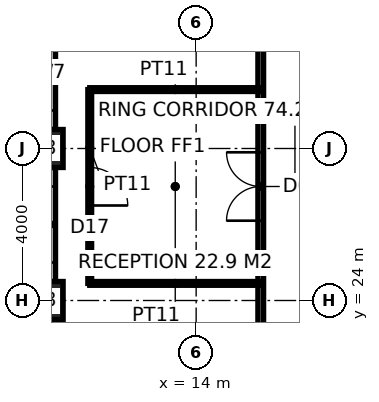
"""IFC4 building model, lengths in metres.
Left out: names, types, materials, properties, quantities, classifications, styles, units other than length and angle.
Written with IfcOpenShell. Run it as: python <this file> out.ifc"""

import sys

from ifc_helpers import new_model, si_unit, direction, frame, frame_2d, origin, origin_2d, place, context, subcontext, project, spatial, rectangle, hollow_rectangle, extrude, element, fill, save


model = new_model("IFC4")
c1 = context("Model", 3, precision=1e-05, world=origin(), true_north=direction((0.0, 1.0)))
c2 = subcontext(c1, "Body", "Model", "MODEL_VIEW")
j1 = project(units=[si_unit("LENGTHUNIT", "METRE"), si_unit("PLANEANGLEUNIT", "RADIAN")], contexts=[c1])
p1 = place(None, origin())
s1 = spatial("IfcSite", under=j1, at=p1, CompositionType="ELEMENT")
p2 = place(p1, origin())
s2 = spatial("IfcBuilding", under=s1, at=p2, CompositionType="ELEMENT")
p3 = place(p2, frame((0.0, 0.0, 101.4)))
s3 = spatial("IfcBuildingStorey", under=s2, at=p3, CompositionType="ELEMENT", Elevation=101.4)
for number, where, z_axis, x_axis in (
    (1, (10.0, 24.0, 0.0), (0.0, 0.0, 1.0), (1.0, 0.0, 0.0)),
    (2, (10.0, 28.0, 0.0), (0.0, 0.0, 1.0), (1.0, 0.0, 0.0)),
):
    element("IfcColumn", number, at=place(p3, frame(where, z_axis=z_axis, x_axis=x_axis)), inside=s3, PredefinedType="COLUMN", context=c2, shape_type="SweptSolid", body=[
        extrude(hollow_rectangle(XDim=1.0, YDim=1.0, WallThickness=0.125, at=origin_2d()), origin(), (0.0, 0.0, 1.0), 4.0),
    ])
p4 = place(p3, frame((15.7, 15.625, 0.0), z_axis=(0.0, 0.0, 1.0), x_axis=(0.0, 1.0, 0.0)))
e3 = element("IfcWall", 3, at=p4, inside=s3, PredefinedType="PARTITIONING", context=c2, shape_type="SweptSolid", body=[
    extrude(rectangle(XDim=22.75, YDim=0.15, at=frame_2d((11.375, 0.0))), origin(), (0.0, 0.0, 1.0), 3.85),
])
p5 = place(p4, frame((10.475, 0.0, 0.0)))
e4 = element("IfcOpeningElement", 4, at=p5, cuts=e3, PredefinedType="OPENING", context=c2, shape_type="SweptSolid", body=[
    extrude(rectangle(XDim=1.8, YDim=2.4, at=frame_2d((0.9, 1.2))), frame((0.0, 0.085, 0.0), z_axis=(0.0, -1.0, 0.0), x_axis=(1.0, 0.0, 0.0)), (0.0, 0.0, 1.0), 0.17),
])
p6 = place(p3, frame((15.7, 29.55, 0.0), z_axis=(0.0, 0.0, 1.0), x_axis=(-1.0, 0.0, 0.0)))
e5 = element("IfcWall", 5, at=p6, inside=s3, PredefinedType="PARTITIONING", context=c2, shape_type="SweptSolid", body=[
    extrude(rectangle(XDim=4.5, YDim=0.1, at=frame_2d((2.25, 0.0))), origin(), (0.0, 0.0, 1.0), 3.85),
])
p7 = place(p3, frame((11.2, 29.55, 0.0), z_axis=(0.0, 0.0, 1.0), x_axis=(0.0, -1.0, 0.0)))
e6 = element("IfcWall", 6, at=p7, inside=s3, PredefinedType="PARTITIONING", context=c2, shape_type="SweptSolid", body=[
    extrude(rectangle(XDim=5.1, YDim=0.1, at=frame_2d((2.55, 0.0))), origin(), (0.0, 0.0, 1.0), 3.85),
])
p8 = place(p7, frame((2.05, 0.0, 0.0)))
e7 = element("IfcOpeningElement", 7, at=p8, cuts=e6, PredefinedType="OPENING", context=c2, shape_type="SweptSolid", body=[
    extrude(rectangle(XDim=1.0, YDim=2.2, at=frame_2d((0.5, 1.1))), frame((0.0, 0.06, 0.0), z_axis=(0.0, -1.0, 0.0), x_axis=(1.0, 0.0, 0.0)), (0.0, 0.0, 1.0), 0.12),
])
p9 = place(p3, frame((11.2, 24.45, 0.0), z_axis=(0.0, 0.0, 1.0), x_axis=(1.0, 0.0, 0.0)))
e8 = element("IfcWall", 8, at=p9, inside=s3, PredefinedType="PARTITIONING", context=c2, shape_type="SweptSolid", body=[
    extrude(rectangle(XDim=4.5, YDim=0.1, at=frame_2d((2.25, 0.0))), origin(), (0.0, 0.0, 1.0), 2.65),
])
p10 = place(p3, frame((10.15, 23.5, 0.0), z_axis=(0.0, 0.0, 1.0), x_axis=(0.0, -1.0, 0.0)))
e9 = element("IfcWall", 9, at=p10, inside=s3, PredefinedType="ELEMENTEDWALL", context=c2, shape_type="SweptSolid", body=[
    extrude(rectangle(XDim=3.0, YDim=0.3, at=frame_2d((1.5, 0.0))), origin(), (0.0, 0.0, 1.0), 2.95),
])
p11 = place(p10, frame((0.5, 0.0, 0.8)))
e10 = element("IfcOpeningElement", 10, at=p11, cuts=e9, PredefinedType="OPENING", context=c2, shape_type="SweptSolid", body=[
    extrude(rectangle(XDim=2.0, YDim=1.8, at=frame_2d((1.0, 0.9))), frame((0.0, 0.16, 0.0), z_axis=(0.0, -1.0, 0.0), x_axis=(1.0, 0.0, 0.0)), (0.0, 0.0, 1.0), 0.32),
])
p12 = place(p3, frame((10.15, 27.5, 0.0), z_axis=(0.0, 0.0, 1.0), x_axis=(0.0, -1.0, 0.0)))
e11 = element("IfcWall", 11, at=p12, inside=s3, PredefinedType="ELEMENTEDWALL", context=c2, shape_type="SweptSolid", body=[
    extrude(rectangle(XDim=3.0, YDim=0.3, at=frame_2d((1.5, 0.0))), origin(), (0.0, 0.0, 1.0), 2.95),
])
p13 = place(p12, frame((0.5, 0.0, 0.8)))
e12 = element("IfcOpeningElement", 12, at=p13, cuts=e11, PredefinedType="OPENING", context=c2, shape_type="SweptSolid", body=[
    extrude(rectangle(XDim=2.0, YDim=1.8, at=frame_2d((1.0, 0.9))), frame((0.0, 0.16, 0.0), z_axis=(0.0, -1.0, 0.0), x_axis=(1.0, 0.0, 0.0)), (0.0, 0.0, 1.0), 0.32),
])
p14 = place(p3, frame((10.15, 31.5, 0.0), z_axis=(0.0, 0.0, 1.0), x_axis=(0.0, -1.0, 0.0)))
e13 = element("IfcWall", 13, at=p14, inside=s3, PredefinedType="ELEMENTEDWALL", context=c2, shape_type="SweptSolid", body=[
    extrude(rectangle(XDim=3.0, YDim=0.3, at=frame_2d((1.5, 0.0))), origin(), (0.0, 0.0, 1.0), 2.95),
])
p15 = place(p14, frame((0.5, 0.0, 0.8)))
e14 = element("IfcOpeningElement", 14, at=p15, cuts=e13, PredefinedType="OPENING", context=c2, shape_type="SweptSolid", body=[
    extrude(rectangle(XDim=2.0, YDim=1.8, at=frame_2d((1.0, 0.9))), frame((0.0, 0.16, 0.0), z_axis=(0.0, -1.0, 0.0), x_axis=(1.0, 0.0, 0.0)), (0.0, 0.0, 1.0), 0.32),
])
p16 = place(p5, origin())
e15 = element("IfcDoor", 15, at=p16, inside=s3, OperationType="DOUBLE_DOOR_DOUBLE_SWING", PredefinedType="DOOR", context=c2, shape_type="SweptSolid", body=[
    extrude(rectangle(XDim=1.8, YDim=2.4, at=frame_2d((0.9, 1.2))), frame((0.0, 0.025, 0.0), z_axis=(0.0, -1.0, 0.0), x_axis=(1.0, 0.0, 0.0)), (0.0, 0.0, 1.0), 0.05),
])
fill(e4, e15)
p17 = place(p8, origin())
e16 = element("IfcDoor", 16, at=p17, inside=s3, OperationType="SINGLE_SWING_RIGHT", PredefinedType="DOOR", context=c2, shape_type="SweptSolid", body=[
    extrude(rectangle(XDim=1.0, YDim=2.2, at=frame_2d((0.5, 1.1))), frame((0.0, 0.025, 0.0), z_axis=(0.0, -1.0, 0.0), x_axis=(1.0, 0.0, 0.0)), (0.0, 0.0, 1.0), 0.05),
])
fill(e7, e16)
save(model, sys.argv[1])
